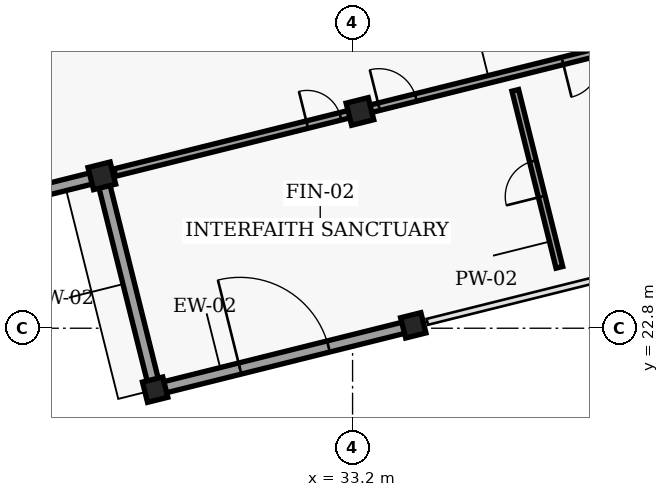
"""IFC4 building model, lengths in metres.
Left out: names, types, materials, properties, quantities, classifications, styles, units other than length and angle.
Written with IfcOpenShell. Run it as: python <this file> out.ifc"""

import sys

from ifc_helpers import new_model, si_unit, direction, frame, frame_2d, origin, origin_2d, place, context, subcontext, project, spatial, rectangle, extrude, element, fill, save


model = new_model("IFC4")
c1 = context("Model", 3, precision=1e-05, world=origin(), true_north=direction((0.0, 1.0)))
c2 = subcontext(c1, "Body", "Model", "MODEL_VIEW")
j1 = project(units=[si_unit("LENGTHUNIT", "METRE"), si_unit("PLANEANGLEUNIT", "RADIAN")], contexts=[c1])
p1 = place(None, origin())
s1 = spatial("IfcSite", under=j1, at=p1, CompositionType="ELEMENT")
p2 = place(p1, origin())
s2 = spatial("IfcBuilding", under=s1, at=p2, CompositionType="ELEMENT")
p3 = place(p2, origin())
s3 = spatial("IfcBuildingStorey", under=s2, at=p3, CompositionType="ELEMENT", Elevation=0.0)
for number, where, z_axis, x_axis in (
    (1, (28.005, 21.183, 0.0), (0.0, 0.0, 1.0), (0.97, 0.242, 0.0)),
    (2, (34.797, 22.876, 0.0), (0.0, 0.0, 1.0), (0.97, 0.242, 0.0)),
):
    element("IfcColumn", number, at=place(p3, frame(where, z_axis=z_axis, x_axis=x_axis)), inside=s3, PredefinedType="COLUMN", context=c2, shape_type="SweptSolid", body=[
        extrude(rectangle(XDim=0.55, YDim=0.55, at=origin_2d()), origin(), (0.0, 0.0, 1.0), 4.8),
    ])
for number, where, z_axis, x_axis in (
    (3, (26.602, 26.81, 0.0), (0.0, 0.0, 1.0), (0.97, 0.242, 0.0)),
    (4, (33.394, 28.504, 0.0), (0.0, 0.0, 1.0), (0.97, 0.242, 0.0)),
):
    element("IfcColumn", number, at=place(p3, frame(where, z_axis=z_axis, x_axis=x_axis)), inside=s3, PredefinedType="COLUMN", context=c2, shape_type="SweptSolid", body=[
        extrude(rectangle(XDim=0.6, YDim=0.6, at=origin_2d()), origin(), (0.0, 0.0, 1.0), 4.8),
    ])
p4 = place(p3, frame((28.102, 21.207, 0.0), z_axis=(0.0, 0.0, 1.0), x_axis=(0.970296478685, 0.241918877831, 0.0)))
e5 = element("IfcWall", 5, at=p4, inside=s3, PredefinedType="SOLIDWALL", context=c2, shape_type="SweptSolid", body=[
    extrude(rectangle(XDim=6.8, YDim=0.3, at=frame_2d((3.4, 0.0))), origin(), (0.0, 0.0, 1.0), 4.065),
])
p5 = place(p4, frame((2.2, 0.0, 0.0)))
e6 = element("IfcOpeningElement", 6, at=p5, cuts=e5, PredefinedType="OPENING", context=c2, shape_type="SweptSolid", body=[
    extrude(rectangle(XDim=2.4, YDim=2.4, at=frame_2d((1.2, 1.2))), frame((0.0, 0.16, 0.0), z_axis=(0.0, -1.0, 0.0), x_axis=(1.0, 0.0, 0.0)), (0.0, 0.0, 1.0), 0.32),
])
p6 = place(p3, frame((27.986, 21.261, 0.0), z_axis=(0.0, 0.0, 1.0), x_axis=(-0.242077152267, 0.970257003247, 0.0)))
e7 = element("IfcWall", 7, at=p6, inside=s3, PredefinedType="SOLIDWALL", context=c2, shape_type="SweptSolid", body=[
    extrude(rectangle(XDim=5.639, YDim=0.3, at=frame_2d((2.819, 0.0))), origin(), (0.0, 0.0, 1.0), 4.095),
])
p7 = place(p3, frame((19.887, 25.136, 0.0), z_axis=(0.0, 0.0, 1.0), x_axis=(0.970287194641, 0.241956111549, 0.0)))
e8 = element("IfcWall", 8, at=p7, inside=s3, PredefinedType="SOLIDWALL", context=c2, shape_type="SweptSolid", body=[
    extrude(rectangle(XDim=6.84, YDim=0.3, at=frame_2d((3.42, 0.0))), origin(), (0.0, 0.0, 1.0), 4.085),
])
p8 = place(p3, frame((26.942, 26.895, 0.0), z_axis=(0.0, 0.0, 1.0), x_axis=(0.970294418067, 0.241927142478, 0.0)))
e9 = element("IfcWall", 9, at=p8, inside=s3, PredefinedType="PARTITIONING", context=c2, shape_type="SweptSolid", body=[
    extrude(rectangle(XDim=20.299, YDim=0.2, at=frame_2d((10.149, 0.0))), origin(), (0.0, 0.0, 1.0), 3.845),
])
p9 = place(p8, frame((7.166, 0.0, 0.0)))
e10 = element("IfcOpeningElement", 10, at=p9, cuts=e9, PredefinedType="OPENING", context=c2, shape_type="SweptSolid", body=[
    extrude(rectangle(XDim=1.0, YDim=2.14, at=frame_2d((0.5, 1.07))), frame((0.0, 0.11, 0.0), z_axis=(0.0, -1.0, 0.0), x_axis=(1.0, 0.0, 0.0)), (0.0, 0.0, 1.0), 0.22),
])
p10 = place(p8, frame((12.143, 0.0, 0.0)))
e11 = element("IfcOpeningElement", 11, at=p10, cuts=e9, PredefinedType="OPENING", context=c2, shape_type="SweptSolid", body=[
    extrude(rectangle(XDim=0.98, YDim=2.12, at=frame_2d((0.49, 1.06))), frame((0.0, 0.11, 0.0), z_axis=(0.0, -1.0, 0.0), x_axis=(1.0, 0.0, 0.0)), (0.0, 0.0, 1.0), 0.22),
])
p11 = place(p8, frame((5.219, 0.0, 0.0)))
e12 = element("IfcOpeningElement", 12, at=p11, cuts=e9, PredefinedType="OPENING", context=c2, shape_type="SweptSolid", body=[
    extrude(rectangle(XDim=0.9, YDim=2.06, at=frame_2d((0.45, 1.03))), frame((0.0, 0.11, 0.0), z_axis=(0.0, -1.0, 0.0), x_axis=(1.0, 0.0, 0.0)), (0.0, 0.0, 1.0), 0.22),
])
p12 = place(p8, frame((14.779, 0.0, 0.0)))
e13 = element("IfcOpeningElement", 13, at=p12, cuts=e9, PredefinedType="OPENING", context=c2, shape_type="SweptSolid", body=[
    extrude(rectangle(XDim=0.9, YDim=2.06, at=frame_2d((0.45, 1.03))), frame((0.0, 0.11, 0.0), z_axis=(0.0, -1.0, 0.0), x_axis=(1.0, 0.0, 0.0)), (0.0, 0.0, 1.0), 0.22),
])
p13 = place(p3, frame((38.642, 24.402, 0.0), z_axis=(0.0, 0.0, 1.0), x_axis=(-0.241925168697, 0.970294910195, 0.0)))
e14 = element("IfcWall", 14, at=p13, inside=s3, PredefinedType="PARTITIONING", context=c2, shape_type="SweptSolid", body=[
    extrude(rectangle(XDim=4.8, YDim=0.18, at=frame_2d((2.4, 0.0))), origin(), (0.0, 0.0, 1.0), 4.545),
])
p14 = place(p13, frame((1.92, 0.0, 0.0)))
e15 = element("IfcOpeningElement", 15, at=p14, cuts=e14, PredefinedType="OPENING", context=c2, shape_type="SweptSolid", body=[
    extrude(rectangle(XDim=0.96, YDim=2.08, at=frame_2d((0.48, 1.04))), frame((0.0, 0.1, 0.0), z_axis=(0.0, -1.0, 0.0), x_axis=(1.0, 0.0, 0.0)), (0.0, 0.0, 1.0), 0.2),
])
p15 = place(p5, origin())
e16 = element("IfcDoor", 16, at=p15, inside=s3, OperationType="DOUBLE_DOOR_SINGLE_SWING", PredefinedType="DOOR", context=c2, shape_type="SweptSolid", body=[
    extrude(rectangle(XDim=2.4, YDim=2.4, at=frame_2d((1.2, 1.2))), frame((0.0, 0.025, 0.0), z_axis=(0.0, -1.0, 0.0), x_axis=(1.0, 0.0, 0.0)), (0.0, 0.0, 1.0), 0.05),
])
fill(e6, e16)
p16 = place(p9, origin())
e17 = element("IfcDoor", 17, at=p16, inside=s3, OperationType="SINGLE_SWING_LEFT", PredefinedType="DOOR", context=c2, shape_type="SweptSolid", body=[
    extrude(rectangle(XDim=1.0, YDim=2.14, at=frame_2d((0.5, 1.07))), frame((0.0, 0.025, 0.0), z_axis=(0.0, -1.0, 0.0), x_axis=(1.0, 0.0, 0.0)), (0.0, 0.0, 1.0), 0.05),
])
fill(e10, e17)
p17 = place(p10, origin())
e18 = element("IfcDoor", 18, at=p17, inside=s3, OperationType="SINGLE_SWING_RIGHT", PredefinedType="DOOR", context=c2, shape_type="SweptSolid", body=[
    extrude(rectangle(XDim=0.98, YDim=2.12, at=frame_2d((0.49, 1.06))), frame((0.0, 0.025, 0.0), z_axis=(0.0, -1.0, 0.0), x_axis=(1.0, 0.0, 0.0)), (0.0, 0.0, 1.0), 0.05),
])
fill(e11, e18)
p18 = place(p14, origin())
e19 = element("IfcDoor", 19, at=p18, inside=s3, OperationType="SINGLE_SWING_LEFT", PredefinedType="DOOR", context=c2, shape_type="SweptSolid", body=[
    extrude(rectangle(XDim=0.96, YDim=2.08, at=frame_2d((0.48, 1.04))), frame((0.0, 0.025, 0.0), z_axis=(0.0, -1.0, 0.0), x_axis=(1.0, 0.0, 0.0)), (0.0, 0.0, 1.0), 0.05),
])
fill(e15, e19)
p19 = place(p11, origin())
e20 = element("IfcDoor", 20, at=p19, inside=s3, OperationType="SINGLE_SWING_LEFT", PredefinedType="DOOR", context=c2, shape_type="SweptSolid", body=[
    extrude(rectangle(XDim=0.9, YDim=2.06, at=frame_2d((0.45, 1.03))), frame((0.0, 0.025, 0.0), z_axis=(0.0, -1.0, 0.0), x_axis=(1.0, 0.0, 0.0)), (0.0, 0.0, 1.0), 0.05),
])
fill(e12, e20)
save(model, sys.argv[1])
